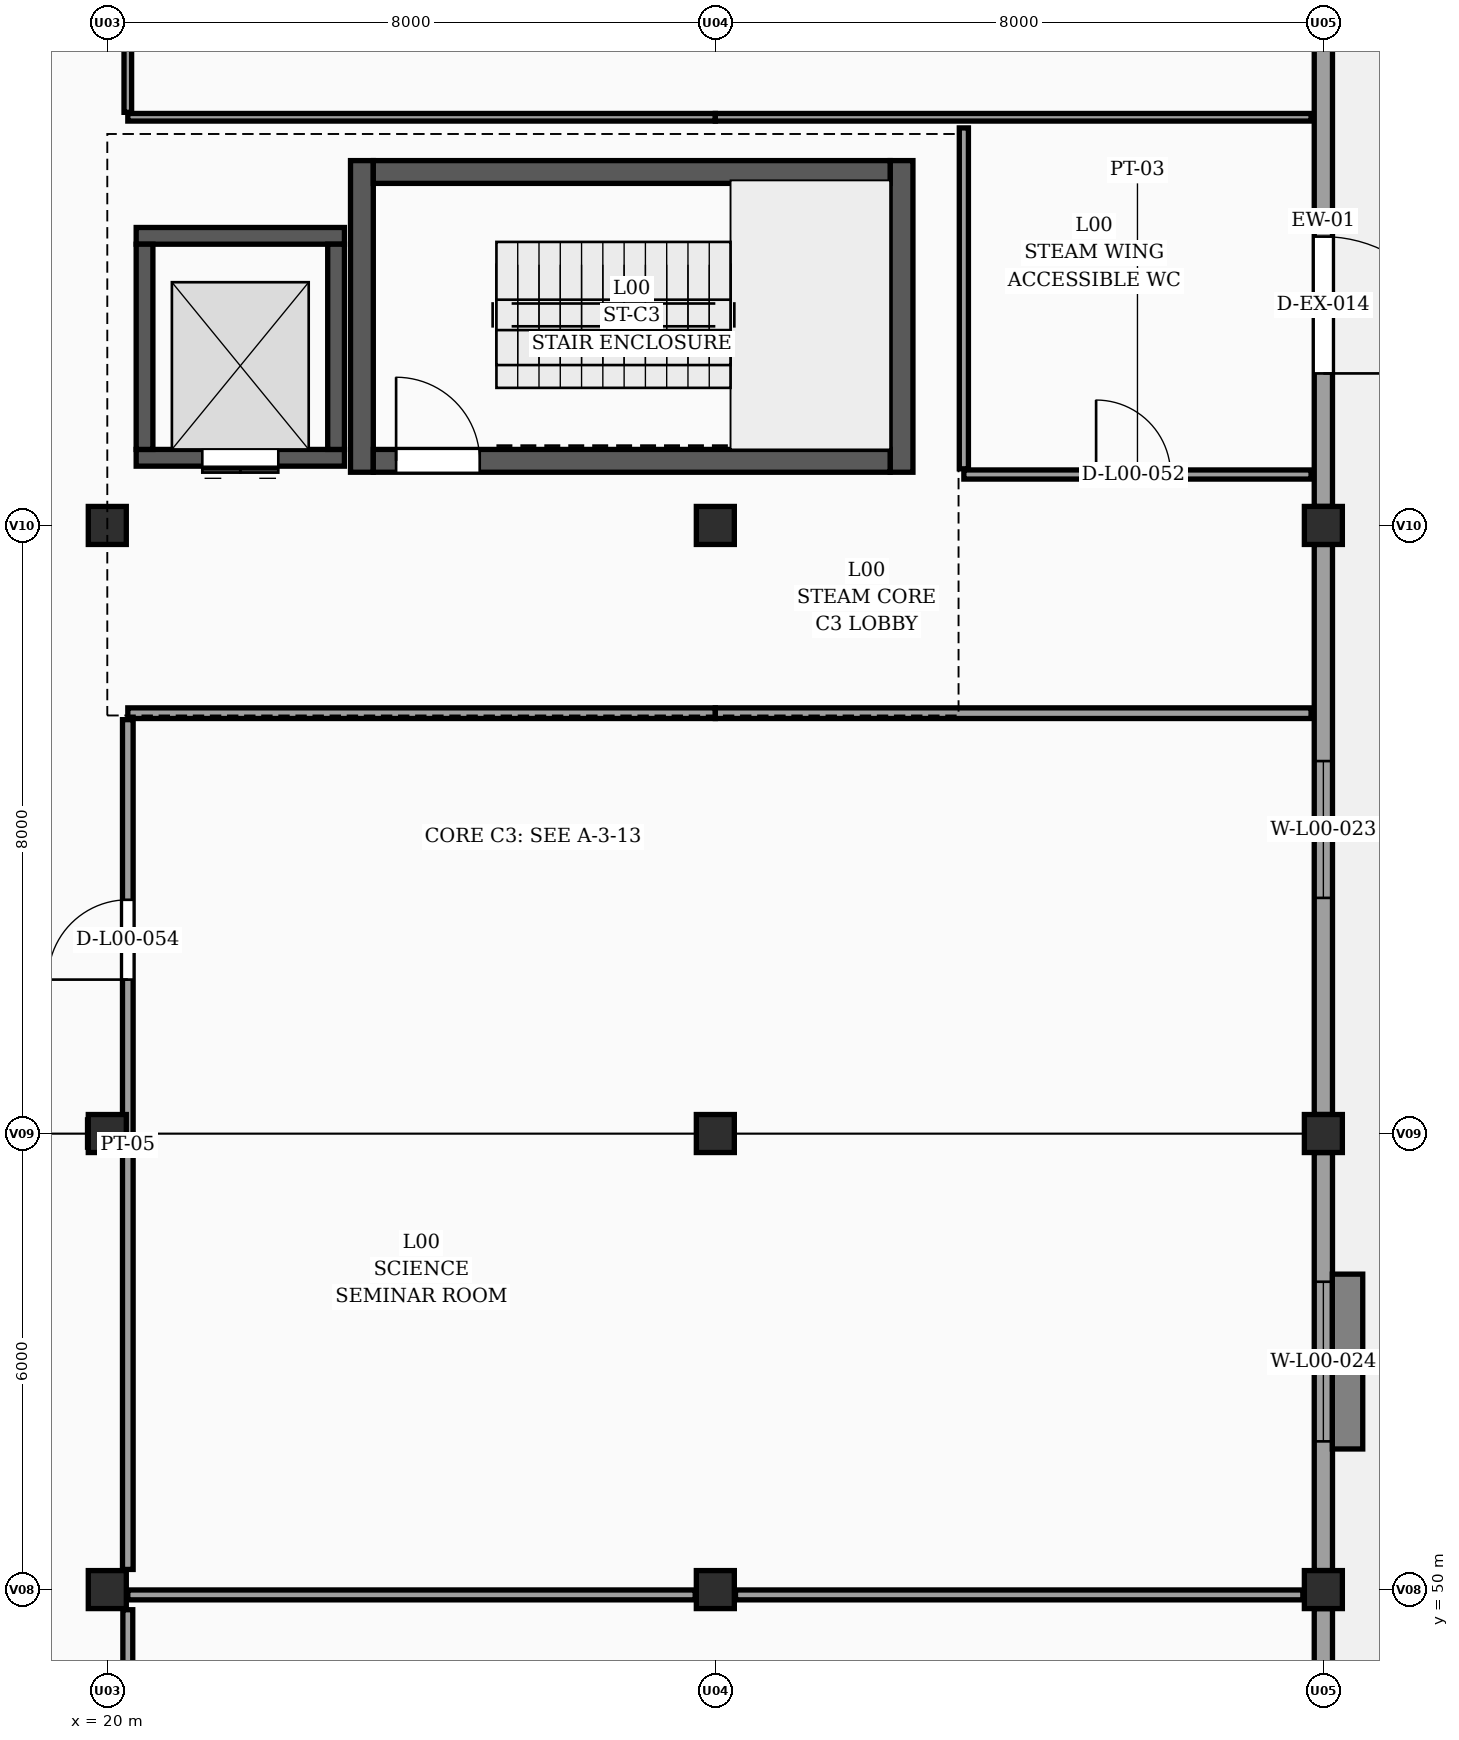
"""IFC4 building model, lengths in metres.
Left out: names, types, materials, properties, quantities, classifications, styles, units other than length and angle.
Written with IfcOpenShell. Run it as: python <this file> out.ifc"""

import sys

from ifc_helpers import new_model, si_unit, direction, frame, frame_2d, origin, origin_2d, place, context, subcontext, project, spatial, rectangle, extrude, element, fill, save


model = new_model("IFC4")
c1 = context("Model", 3, precision=1e-05, world=origin(), true_north=direction((0.0, 1.0)))
c2 = subcontext(c1, "Body", "Model", "MODEL_VIEW")
j1 = project(units=[si_unit("LENGTHUNIT", "METRE"), si_unit("PLANEANGLEUNIT", "RADIAN")], contexts=[c1])
p1 = place(None, origin())
s1 = spatial("IfcSite", under=j1, at=p1, CompositionType="ELEMENT")
p2 = place(p1, origin())
s2 = spatial("IfcBuilding", under=s1, at=p2, CompositionType="ELEMENT")
p3 = place(p2, origin())
s3 = spatial("IfcBuildingStorey", under=s2, at=p3, CompositionType="ELEMENT", Elevation=0.0)
for number, where, z_axis, x_axis in (
    (1, (20.0, 50.0, -0.2), (0.0, 0.0, 1.0), (1.0, 0.0, 0.0)),
    (2, (20.0, 56.0, -0.2), (0.0, 0.0, 1.0), (1.0, 0.0, 0.0)),
    (3, (20.0, 64.0, -0.2), (0.0, 0.0, 1.0), (1.0, 0.0, 0.0)),
    (4, (28.0, 50.0, -0.2), (0.0, 0.0, 1.0), (1.0, 0.0, 0.0)),
    (5, (28.0, 56.0, -0.2), (0.0, 0.0, 1.0), (1.0, 0.0, 0.0)),
    (6, (28.0, 64.0, -0.2), (0.0, 0.0, 1.0), (1.0, 0.0, 0.0)),
    (7, (36.0, 50.0, -0.2), (0.0, 0.0, 1.0), (1.0, 0.0, 0.0)),
    (8, (36.0, 56.0, -0.2), (0.0, 0.0, 1.0), (1.0, 0.0, 0.0)),
    (9, (36.0, 64.0, -0.2), (0.0, 0.0, 1.0), (1.0, 0.0, 0.0)),
):
    element("IfcColumn", number, at=place(p3, frame(where, z_axis=z_axis, x_axis=x_axis)), inside=s3, PredefinedType="COLUMN", context=c2, shape_type="SweptSolid", body=[
        extrude(rectangle(XDim=0.5, YDim=0.5, at=origin_2d()), origin(), (0.0, 0.0, 1.0), 4.7),
    ])
p4 = place(p3, frame((36.0, 71.75, 0.0), z_axis=(0.0, 0.0, 1.0), x_axis=(0.0, -1.0, 0.0)))
e10 = element("IfcWall", 10, at=p4, inside=s3, PredefinedType="SOLIDWALL", context=c2, shape_type="SweptSolid", body=[
    extrude(rectangle(XDim=7.5, YDim=0.24, at=frame_2d((3.75, 0.0))), origin(), (0.0, 0.0, 1.0), 3.59),
])
p5 = place(p4, frame((3.95, 0.0, 0.0)))
e11 = element("IfcOpeningElement", 11, at=p5, cuts=e10, PredefinedType="OPENING", context=c2, shape_type="SweptSolid", body=[
    extrude(rectangle(XDim=1.8, YDim=2.2, at=frame_2d((0.9, 1.1))), frame((0.0, 0.13, 0.0), z_axis=(0.0, -1.0, 0.0), x_axis=(1.0, 0.0, 0.0)), (0.0, 0.0, 1.0), 0.26),
])
p6 = place(p3, frame((36.0, 63.75, 0.0), z_axis=(0.0, 0.0, 1.0), x_axis=(0.0, -1.0, 0.0)))
e12 = element("IfcWall", 12, at=p6, inside=s3, PredefinedType="SOLIDWALL", context=c2, shape_type="SweptSolid", body=[
    extrude(rectangle(XDim=7.5, YDim=0.24, at=frame_2d((3.75, 0.0))), origin(), (0.0, 0.0, 1.0), 3.59),
])
p7 = place(p6, frame((2.85, 0.0, 0.95)))
e13 = element("IfcOpeningElement", 13, at=p7, cuts=e12, PredefinedType="OPENING", context=c2, shape_type="SweptSolid", body=[
    extrude(rectangle(XDim=1.8, YDim=1.2, at=frame_2d((0.9, 0.6))), frame((0.0, 0.13, 0.0), z_axis=(0.0, -1.0, 0.0), x_axis=(1.0, 0.0, 0.0)), (0.0, 0.0, 1.0), 0.26),
])
p8 = place(p3, frame((36.0, 55.75, 0.0), z_axis=(0.0, 0.0, 1.0), x_axis=(0.0, -1.0, 0.0)))
e14 = element("IfcWall", 14, at=p8, inside=s3, PredefinedType="SOLIDWALL", context=c2, shape_type="SweptSolid", body=[
    extrude(rectangle(XDim=5.5, YDim=0.24, at=frame_2d((2.75, 0.0))), origin(), (0.0, 0.0, 1.0), 3.59),
])
p9 = place(p8, frame((1.7, 0.0, 0.95)))
e15 = element("IfcOpeningElement", 15, at=p9, cuts=e14, PredefinedType="OPENING", context=c2, shape_type="SweptSolid", body=[
    extrude(rectangle(XDim=2.1, YDim=1.2, at=frame_2d((1.05, 0.6))), frame((0.0, 0.13, 0.0), z_axis=(0.0, -1.0, 0.0), x_axis=(1.0, 0.0, 0.0)), (0.0, 0.0, 1.0), 0.26),
])
p10 = place(p3, frame((36.0, 49.75, 0.0), z_axis=(0.0, 0.0, 1.0), x_axis=(0.0, -1.0, 0.0)))
e16 = element("IfcWall", 16, at=p10, inside=s3, PredefinedType="SOLIDWALL", context=c2, shape_type="SweptSolid", body=[
    extrude(rectangle(XDim=5.5, YDim=0.24, at=frame_2d((2.75, 0.0))), origin(), (0.0, 0.0, 1.0), 3.59),
])
p11 = place(p10, frame((2.05, 0.0, 0.95)))
e17 = element("IfcOpeningElement", 17, at=p11, cuts=e16, PredefinedType="OPENING", context=c2, shape_type="SweptSolid", body=[
    extrude(rectangle(XDim=1.4, YDim=1.8, at=frame_2d((0.7, 0.9))), frame((0.0, 0.13, 0.0), z_axis=(0.0, -1.0, 0.0), x_axis=(1.0, 0.0, 0.0)), (0.0, 0.0, 1.0), 0.26),
])
for number, where, z_axis, x_axis in (
    (18, (23.35, 64.7, 0.0), (0.0, 0.0, 1.0), (0.0, 1.0, 0.0)),
    (19, (30.45, 68.8, 0.0), (0.0, 0.0, 1.0), (0.0, -1.0, 0.0)),
):
    element("IfcWall", number, at=place(p3, frame(where, z_axis=z_axis, x_axis=x_axis)), inside=s3, PredefinedType="SHEAR", context=c2, shape_type="SweptSolid", body=[
        extrude(rectangle(XDim=4.1, YDim=0.3, at=frame_2d((2.05, 0.0))), origin(), (0.0, 0.0, 1.0), 4.24),
    ])
p12 = place(p3, frame((23.5, 64.85, 0.0), z_axis=(0.0, 0.0, 1.0), x_axis=(1.0, 0.0, 0.0)))
e20 = element("IfcWall", 20, at=p12, inside=s3, PredefinedType="SHEAR", context=c2, shape_type="SweptSolid", body=[
    extrude(rectangle(XDim=6.8, YDim=0.3, at=frame_2d((3.4, 0.0))), origin(), (0.0, 0.0, 1.0), 4.24),
])
p13 = place(p12, frame((0.3, 0.0, 0.0)))
e21 = element("IfcOpeningElement", 21, at=p13, cuts=e20, PredefinedType="OPENING", context=c2, shape_type="SweptSolid", body=[
    extrude(rectangle(XDim=1.1, YDim=2.15, at=frame_2d((0.55, 1.075))), frame((0.0, 0.16, 0.0), z_axis=(0.0, -1.0, 0.0), x_axis=(1.0, 0.0, 0.0)), (0.0, 0.0, 1.0), 0.32),
])
p14 = place(p3, frame((30.3, 68.65, 0.0), z_axis=(0.0, 0.0, 1.0), x_axis=(-1.0, 0.0, 0.0)))
e22 = element("IfcWall", 22, at=p14, inside=s3, PredefinedType="SHEAR", context=c2, shape_type="SweptSolid", body=[
    extrude(rectangle(XDim=6.8, YDim=0.3, at=frame_2d((3.4, 0.0))), origin(), (0.0, 0.0, 1.0), 4.24),
])
p15 = place(p3, frame((23.12, 64.89, 0.0), z_axis=(0.0, 0.0, 1.0), x_axis=(-1.0, 0.0, 0.0)))
e23 = element("IfcWall", 23, at=p15, inside=s3, PredefinedType="SHEAR", context=c2, shape_type="SweptSolid", body=[
    extrude(rectangle(XDim=2.74, YDim=0.22, at=frame_2d((1.37, 0.0))), origin(), (0.0, 0.0, 1.0), 4.24),
])
p16 = place(p15, frame((0.87, 0.0, 0.0)))
e24 = element("IfcOpeningElement", 24, at=p16, cuts=e23, PredefinedType="OPENING", context=c2, shape_type="SweptSolid", body=[
    extrude(rectangle(XDim=1.0, YDim=2.15, at=frame_2d((0.5, 1.075))), frame((0.0, 0.12, 0.0), z_axis=(0.0, -1.0, 0.0), x_axis=(1.0, 0.0, 0.0)), (0.0, 0.0, 1.0), 0.24),
])
p17 = place(p3, frame((20.38, 67.81, 0.0), z_axis=(0.0, 0.0, 1.0), x_axis=(1.0, 0.0, 0.0)))
e25 = element("IfcWall", 25, at=p17, inside=s3, PredefinedType="SHEAR", context=c2, shape_type="SweptSolid", body=[
    extrude(rectangle(XDim=2.74, YDim=0.22, at=frame_2d((1.37, 0.0))), origin(), (0.0, 0.0, 1.0), 4.24),
])
for number, where, z_axis, x_axis in (
    (26, (20.49, 65.0, 0.0), (0.0, 0.0, 1.0), (0.0, 1.0, 0.0)),
    (27, (23.01, 67.7, 0.0), (0.0, 0.0, 1.0), (0.0, -1.0, 0.0)),
):
    element("IfcWall", number, at=place(p3, frame(where, z_axis=z_axis, x_axis=x_axis)), inside=s3, PredefinedType="SHEAR", context=c2, shape_type="SweptSolid", body=[
        extrude(rectangle(XDim=2.7, YDim=0.22, at=frame_2d((1.35, 0.0))), origin(), (0.0, 0.0, 1.0), 4.24),
    ])
p18 = place(p3, frame((20.27, 69.37, 0.0), z_axis=(0.0, 0.0, 1.0), x_axis=(1.0, 0.0, 0.0)))
e28 = element("IfcWall", 28, at=p18, inside=s3, PredefinedType="PARTITIONING", context=c2, shape_type="SweptSolid", body=[
    extrude(rectangle(XDim=7.73, YDim=0.1, at=frame_2d((3.865, 0.0))), origin(), (0.0, 0.0, 1.0), 4.24),
])
p19 = place(p3, frame((28.0, 69.37, 0.0), z_axis=(0.0, 0.0, 1.0), x_axis=(1.0, 0.0, 0.0)))
e29 = element("IfcWall", 29, at=p19, inside=s3, PredefinedType="PARTITIONING", context=c2, shape_type="SweptSolid", body=[
    extrude(rectangle(XDim=7.838, YDim=0.1, at=frame_2d((3.919, 0.0))), origin(), (0.0, 0.0, 1.0), 4.24),
])
p20 = place(p3, frame((20.27, 69.435, 0.0), z_axis=(0.0, 0.0, 1.0), x_axis=(0.0, 1.0, 0.0)))
e30 = element("IfcWall", 30, at=p20, inside=s3, PredefinedType="PARTITIONING", context=c2, shape_type="SweptSolid", body=[
    extrude(rectangle(XDim=2.3, YDim=0.1, at=frame_2d((1.15, 0.0))), origin(), (0.0, 0.0, 1.0), 3.59),
])
p21 = place(p3, frame((31.27, 64.67, 0.0), z_axis=(0.0, 0.0, 1.0), x_axis=(1.0, 0.0, 0.0)))
e31 = element("IfcWall", 31, at=p21, inside=s3, PredefinedType="PARTITIONING", context=c2, shape_type="SweptSolid", body=[
    extrude(rectangle(XDim=4.568, YDim=0.12, at=frame_2d((2.284, 0.0))), origin(), (0.0, 0.0, 1.0), 4.24),
])
p22 = place(p21, frame((1.74, 0.0, 0.0)))
e32 = element("IfcOpeningElement", 32, at=p22, cuts=e31, PredefinedType="OPENING", context=c2, shape_type="SweptSolid", body=[
    extrude(rectangle(XDim=0.98, YDim=2.1, at=frame_2d((0.49, 1.05))), frame((0.0, 0.07, 0.0), z_axis=(0.0, -1.0, 0.0), x_axis=(1.0, 0.0, 0.0)), (0.0, 0.0, 1.0), 0.14),
])
p23 = place(p3, frame((31.27, 64.745, 0.0), z_axis=(0.0, 0.0, 1.0), x_axis=(0.0, 1.0, 0.0)))
e33 = element("IfcWall", 33, at=p23, inside=s3, PredefinedType="PARTITIONING", context=c2, shape_type="SweptSolid", body=[
    extrude(rectangle(XDim=4.485, YDim=0.12, at=frame_2d((2.242, 0.0))), origin(), (0.0, 0.0, 1.0), 4.24),
])
for number, where, z_axis, x_axis in (
    (34, (20.27, 49.93, 0.0), (0.0, 0.0, 1.0), (1.0, 0.0, 0.0)),
    (35, (28.265, 49.93, 0.0), (0.0, 0.0, 1.0), (1.0, 0.0, 0.0)),
):
    element("IfcWall", number, at=place(p3, frame(where, z_axis=z_axis, x_axis=x_axis)), inside=s3, PredefinedType="PARTITIONING", context=c2, shape_type="SweptSolid", body=[
        extrude(rectangle(XDim=7.465, YDim=0.13, at=frame_2d((3.732, 0.0))), origin(), (0.0, 0.0, 1.0), 3.59),
    ])
p24 = place(p3, frame((20.27, 38.265, 0.0), z_axis=(0.0, 0.0, 1.0), x_axis=(0.0, 1.0, 0.0)))
e36 = element("IfcWall", 36, at=p24, inside=s3, PredefinedType="PARTITIONING", context=c2, shape_type="SweptSolid", body=[
    extrude(rectangle(XDim=11.47, YDim=0.13, at=frame_2d((5.735, 0.0))), origin(), (0.0, 0.0, 1.0), 3.59),
])
p25 = place(p24, frame((8.225, 0.0, 0.0)))
e37 = element("IfcOpeningElement", 37, at=p25, cuts=e36, PredefinedType="OPENING", context=c2, shape_type="SweptSolid", body=[
    extrude(rectangle(XDim=1.02, YDim=2.1, at=frame_2d((0.51, 1.05))), frame((0.0, 0.075, 0.0), z_axis=(0.0, -1.0, 0.0), x_axis=(1.0, 0.0, 0.0)), (0.0, 0.0, 1.0), 0.15),
])
p26 = place(p3, frame((20.27, 61.53, 0.0), z_axis=(0.0, 0.0, 1.0), x_axis=(1.0, 0.0, 0.0)))
e38 = element("IfcWall", 38, at=p26, inside=s3, PredefinedType="PARTITIONING", context=c2, shape_type="SweptSolid", body=[
    extrude(rectangle(XDim=7.73, YDim=0.14, at=frame_2d((3.865, 0.0))), origin(), (0.0, 0.0, 1.0), 4.24),
])
p27 = place(p3, frame((28.0, 61.53, 0.0), z_axis=(0.0, 0.0, 1.0), x_axis=(1.0, 0.0, 0.0)))
e39 = element("IfcWall", 39, at=p27, inside=s3, PredefinedType="PARTITIONING", context=c2, shape_type="SweptSolid", body=[
    extrude(rectangle(XDim=7.838, YDim=0.14, at=frame_2d((3.919, 0.0))), origin(), (0.0, 0.0, 1.0), 4.24),
])
p28 = place(p3, frame((20.27, 50.265, 0.0), z_axis=(0.0, 0.0, 1.0), x_axis=(0.0, 1.0, 0.0)))
e40 = element("IfcWall", 40, at=p28, inside=s3, PredefinedType="PARTITIONING", context=c2, shape_type="SweptSolid", body=[
    extrude(rectangle(XDim=11.18, YDim=0.14, at=frame_2d((5.59, 0.0))), origin(), (0.0, 0.0, 1.0), 3.59),
])
p29 = place(p28, frame((7.76, 0.0, 0.0)))
e41 = element("IfcOpeningElement", 41, at=p29, cuts=e40, PredefinedType="OPENING", context=c2, shape_type="SweptSolid", body=[
    extrude(rectangle(XDim=1.05, YDim=2.1, at=frame_2d((0.525, 1.05))), frame((0.0, 0.08, 0.0), z_axis=(0.0, -1.0, 0.0), x_axis=(1.0, 0.0, 0.0)), (0.0, 0.0, 1.0), 0.16),
])
p30 = place(p5, origin())
e42 = element("IfcDoor", 42, at=p30, inside=s3, OperationType="SINGLE_SWING_RIGHT", PredefinedType="DOOR", context=c2, shape_type="SweptSolid", body=[
    extrude(rectangle(XDim=1.8, YDim=2.2, at=frame_2d((0.9, 1.1))), frame((0.0, 0.025, 0.0), z_axis=(0.0, -1.0, 0.0), x_axis=(1.0, 0.0, 0.0)), (0.0, 0.0, 1.0), 0.05),
])
fill(e11, e42)
p31 = place(p7, origin())
e43 = element("IfcWindow", 43, at=p31, inside=s3, PartitioningType="DOUBLE_PANEL_VERTICAL", PredefinedType="WINDOW", context=c2, shape_type="SweptSolid", body=[
    extrude(rectangle(XDim=1.8, YDim=1.2, at=frame_2d((0.9, 0.6))), frame((0.0, 0.03, 0.0), z_axis=(0.0, -1.0, 0.0), x_axis=(1.0, 0.0, 0.0)), (0.0, 0.0, 1.0), 0.06),
])
fill(e13, e43)
p32 = place(p9, origin())
e44 = element("IfcWindow", 44, at=p32, inside=s3, PartitioningType="DOUBLE_PANEL_VERTICAL", PredefinedType="WINDOW", context=c2, shape_type="SweptSolid", body=[
    extrude(rectangle(XDim=2.1, YDim=1.2, at=frame_2d((1.05, 0.6))), frame((0.0, 0.03, 0.0), z_axis=(0.0, -1.0, 0.0), x_axis=(1.0, 0.0, 0.0)), (0.0, 0.0, 1.0), 0.06),
])
fill(e15, e44)
p33 = place(p13, origin())
e45 = element("IfcDoor", 45, at=p33, inside=s3, OperationType="SINGLE_SWING_LEFT", PredefinedType="DOOR", context=c2, shape_type="SweptSolid", body=[
    extrude(rectangle(XDim=1.1, YDim=2.15, at=frame_2d((0.55, 1.075))), frame((0.0, 0.025, 0.0), z_axis=(0.0, -1.0, 0.0), x_axis=(1.0, 0.0, 0.0)), (0.0, 0.0, 1.0), 0.05),
])
fill(e21, e45)
p34 = place(p16, origin())
e46 = element("IfcDoor", 46, at=p34, inside=s3, OperationType="DOUBLE_DOOR_SLIDING", PredefinedType="DOOR", context=c2, shape_type="SweptSolid", body=[
    extrude(rectangle(XDim=1.0, YDim=2.15, at=frame_2d((0.5, 1.075))), frame((0.0, 0.025, 0.0), z_axis=(0.0, -1.0, 0.0), x_axis=(1.0, 0.0, 0.0)), (0.0, 0.0, 1.0), 0.05),
])
fill(e24, e46)
p35 = place(p22, origin())
e47 = element("IfcDoor", 47, at=p35, inside=s3, OperationType="SINGLE_SWING_LEFT", PredefinedType="DOOR", context=c2, shape_type="SweptSolid", body=[
    extrude(rectangle(XDim=0.98, YDim=2.1, at=frame_2d((0.49, 1.05))), frame((0.0, 0.025, 0.0), z_axis=(0.0, -1.0, 0.0), x_axis=(1.0, 0.0, 0.0)), (0.0, 0.0, 1.0), 0.05),
])
fill(e32, e47)
p36 = place(p29, origin())
e48 = element("IfcDoor", 48, at=p36, inside=s3, OperationType="SINGLE_SWING_LEFT", PredefinedType="DOOR", context=c2, shape_type="SweptSolid", body=[
    extrude(rectangle(XDim=1.05, YDim=2.1, at=frame_2d((0.525, 1.05))), frame((0.0, 0.025, 0.0), z_axis=(0.0, -1.0, 0.0), x_axis=(1.0, 0.0, 0.0)), (0.0, 0.0, 1.0), 0.05),
])
fill(e41, e48)
save(model, sys.argv[1])
